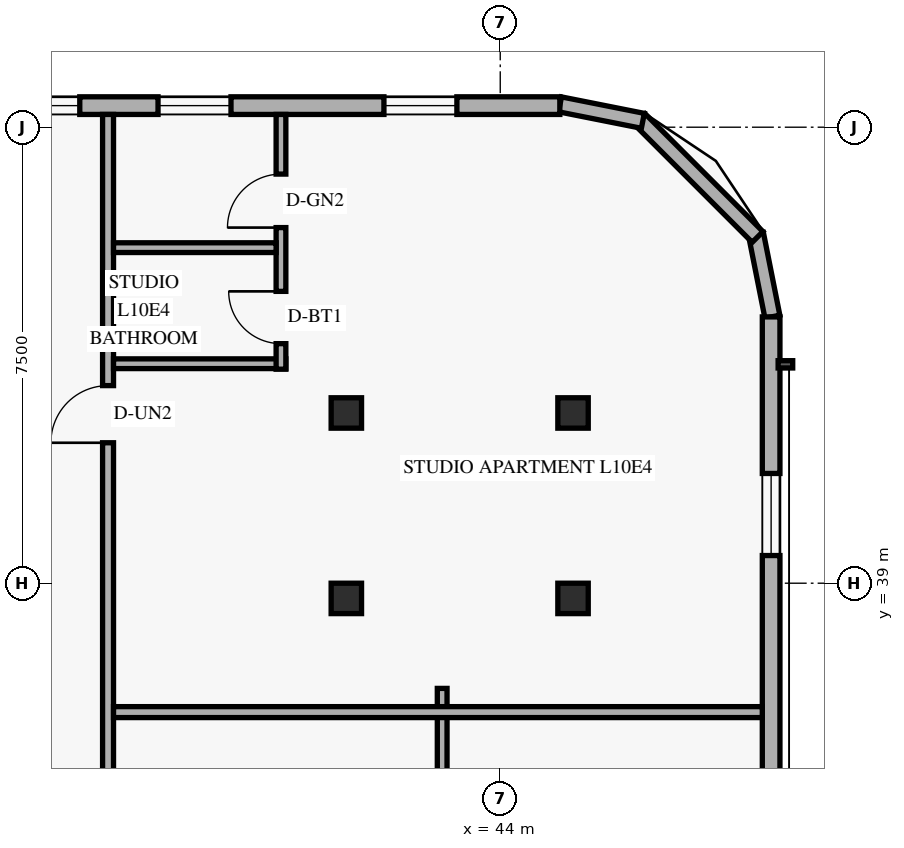
"""IFC4 building model, lengths in metres.
Left out: names, types, materials, properties, quantities, classifications, styles, units other than length and angle.
Written with IfcOpenShell. Run it as: python <this file> out.ifc"""

import sys

from ifc_helpers import new_model, si_unit, direction, frame, frame_2d, origin, origin_2d, place, context, subcontext, project, spatial, rectangle, hollow_rectangle, extrude, element, fill, save


model = new_model("IFC4")
c1 = context("Model", 3, precision=1e-05, world=origin(), true_north=direction((0.0, 1.0)))
c2 = subcontext(c1, "Body", "Model", "MODEL_VIEW")
j1 = project(units=[si_unit("LENGTHUNIT", "METRE"), si_unit("PLANEANGLEUNIT", "RADIAN")], contexts=[c1])
p1 = place(None, origin())
s1 = spatial("IfcSite", under=j1, at=p1, CompositionType="ELEMENT")
p2 = place(p1, origin())
s2 = spatial("IfcBuilding", under=s1, at=p2, CompositionType="ELEMENT")
p3 = place(p2, frame((0.0, 0.0, 42.0)))
s3 = spatial("IfcBuildingStorey", under=s2, at=p3, CompositionType="ELEMENT", Elevation=42.0)
for number, where, z_axis, x_axis in (
    (1, (41.406, 38.75, 0.0), (0.035, 0.0, 0.999), (0.0, 1.0, 0.0)),
    (2, (41.406, 41.8, 0.0), (0.035, 0.0, 0.999), (0.0, 1.0, 0.0)),
):
    element("IfcColumn", number, at=place(p3, frame(where, z_axis=z_axis, x_axis=x_axis)), inside=s3, PredefinedType="COLUMN", context=c2, shape_type="SweptSolid", body=[
        extrude(hollow_rectangle(XDim=0.5, YDim=0.5, WallThickness=0.022, at=origin_2d()), origin(), (0.0, 0.0, 1.0), 3.602),
    ])
for number, where, z_axis, x_axis in (
    (3, (45.093, 38.75, 0.0), (0.058, 0.0, 0.998), (0.0, 1.0, 0.0)),
    (4, (45.093, 41.8, 0.0), (0.058, 0.0, 0.998), (0.0, 1.0, 0.0)),
):
    element("IfcColumn", number, at=place(p3, frame(where, z_axis=z_axis, x_axis=x_axis)), inside=s3, PredefinedType="COLUMN", context=c2, shape_type="SweptSolid", body=[
        extrude(hollow_rectangle(XDim=0.5, YDim=0.5, WallThickness=0.022, at=origin_2d()), origin(), (0.0, 0.0, 1.0), 3.606),
    ])
p4 = place(p3, frame((48.476, 43.384, 0.0), z_axis=(0.0, 0.0, 1.0), x_axis=(-0.19496651342, 0.980809899341, 0.0)))
e5 = element("IfcWall", 5, at=p4, inside=s3, PredefinedType="SOLIDWALL", context=c2, shape_type="SweptSolid", body=[
    extrude(rectangle(XDim=1.389, YDim=0.25, at=frame_2d((0.694, 0.0))), origin(), (0.0, 0.0, 1.0), 3.36),
])
p5 = place(p3, frame((48.232, 44.695, 0.0), z_axis=(0.0, 0.0, 1.0), x_axis=(-0.707106781187, 0.707106781187, 0.0)))
e6 = element("IfcWall", 6, at=p5, inside=s3, PredefinedType="SOLIDWALL", context=c2, shape_type="SweptSolid", body=[
    extrude(rectangle(XDim=2.739, YDim=0.25, at=frame_2d((1.37, 0.0))), origin(), (0.0, 0.0, 1.0), 3.36),
])
p6 = place(p3, frame((46.345, 46.605, 0.0), z_axis=(0.0, 0.0, 1.0), x_axis=(-0.980809899341, 0.19496651342, 0.0)))
e7 = element("IfcWall", 7, at=p6, inside=s3, PredefinedType="SOLIDWALL", context=c2, shape_type="SweptSolid", body=[
    extrude(rectangle(XDim=1.389, YDim=0.25, at=frame_2d((0.694, 0.0))), origin(), (0.0, 0.0, 1.0), 3.36),
])
p7 = place(p3, frame((48.455, 4.62, 0.0), z_axis=(0.0, 0.0, 1.0), x_axis=(0.0, 1.0, 0.0)))
e8 = element("IfcWall", 8, at=p7, inside=s3, PredefinedType="SOLIDWALL", context=c2, shape_type="SweptSolid", body=[
    extrude(rectangle(XDim=38.76, YDim=0.29, at=frame_2d((19.38, 0.0))), origin(), (0.0, 0.0, 1.0), 3.36),
])
p8 = place(p7, frame((3.035, 0.0, 0.85)))
e9 = element("IfcOpeningElement", 9, at=p8, cuts=e8, PredefinedType="OPENING", context=c2, shape_type="SweptSolid", body=[
    extrude(rectangle(XDim=1.35, YDim=1.55, at=frame_2d((0.675, 0.775))), frame((0.0, 0.155, 0.0), z_axis=(0.0, -1.0, 0.0), x_axis=(1.0, 0.0, 0.0)), (0.0, 0.0, 1.0), 0.31),
])
p9 = place(p7, frame((11.365, 0.0, 0.85)))
e10 = element("IfcOpeningElement", 10, at=p9, cuts=e8, PredefinedType="OPENING", context=c2, shape_type="SweptSolid", body=[
    extrude(rectangle(XDim=1.35, YDim=1.55, at=frame_2d((0.675, 0.775))), frame((0.0, 0.155, 0.0), z_axis=(0.0, -1.0, 0.0), x_axis=(1.0, 0.0, 0.0)), (0.0, 0.0, 1.0), 0.31),
])
p10 = place(p7, frame((17.805, 0.0, 0.85)))
e11 = element("IfcOpeningElement", 11, at=p10, cuts=e8, PredefinedType="OPENING", context=c2, shape_type="SweptSolid", body=[
    extrude(rectangle(XDim=1.35, YDim=1.55, at=frame_2d((0.675, 0.775))), frame((0.0, 0.155, 0.0), z_axis=(0.0, -1.0, 0.0), x_axis=(1.0, 0.0, 0.0)), (0.0, 0.0, 1.0), 0.31),
])
p11 = place(p7, frame((23.61, 0.0, 0.85)))
e12 = element("IfcOpeningElement", 12, at=p11, cuts=e8, PredefinedType="OPENING", context=c2, shape_type="SweptSolid", body=[
    extrude(rectangle(XDim=1.35, YDim=1.55, at=frame_2d((0.675, 0.775))), frame((0.0, 0.155, 0.0), z_axis=(0.0, -1.0, 0.0), x_axis=(1.0, 0.0, 0.0)), (0.0, 0.0, 1.0), 0.31),
])
p12 = place(p7, frame((29.59, 0.0, 0.85)))
e13 = element("IfcOpeningElement", 13, at=p12, cuts=e8, PredefinedType="OPENING", context=c2, shape_type="SweptSolid", body=[
    extrude(rectangle(XDim=1.35, YDim=1.55, at=frame_2d((0.675, 0.775))), frame((0.0, 0.155, 0.0), z_axis=(0.0, -1.0, 0.0), x_axis=(1.0, 0.0, 0.0)), (0.0, 0.0, 1.0), 0.31),
])
p13 = place(p7, frame((34.835, 0.0, 0.85)))
e14 = element("IfcOpeningElement", 14, at=p13, cuts=e8, PredefinedType="OPENING", context=c2, shape_type="SweptSolid", body=[
    extrude(rectangle(XDim=1.35, YDim=1.55, at=frame_2d((0.675, 0.775))), frame((0.0, 0.155, 0.0), z_axis=(0.0, -1.0, 0.0), x_axis=(1.0, 0.0, 0.0)), (0.0, 0.0, 1.0), 0.31),
])
p14 = place(p3, frame((44.98, 46.855, 0.0), z_axis=(0.0, 0.0, 1.0), x_axis=(-1.0, 0.0, 0.0)))
e15 = element("IfcWall", 15, at=p14, inside=s3, PredefinedType="SOLIDWALL", context=c2, shape_type="SweptSolid", body=[
    extrude(rectangle(XDim=39.56, YDim=0.29, at=frame_2d((19.78, 0.0))), origin(), (0.0, 0.0, 1.0), 3.36),
])
p15 = place(p14, frame((35.52, 0.0, 0.85)))
e16 = element("IfcOpeningElement", 16, at=p15, cuts=e15, PredefinedType="OPENING", context=c2, shape_type="SweptSolid", body=[
    extrude(rectangle(XDim=1.2, YDim=1.5, at=frame_2d((0.6, 0.75))), frame((0.0, 0.155, 0.0), z_axis=(0.0, -1.0, 0.0), x_axis=(1.0, 0.0, 0.0)), (0.0, 0.0, 1.0), 0.31),
])
p16 = place(p14, frame((31.18, 0.0, 0.85)))
e17 = element("IfcOpeningElement", 17, at=p16, cuts=e15, PredefinedType="OPENING", context=c2, shape_type="SweptSolid", body=[
    extrude(rectangle(XDim=1.2, YDim=1.5, at=frame_2d((0.6, 0.75))), frame((0.0, 0.155, 0.0), z_axis=(0.0, -1.0, 0.0), x_axis=(1.0, 0.0, 0.0)), (0.0, 0.0, 1.0), 0.31),
])
p17 = place(p14, frame((25.909, 0.0, 0.85)))
e18 = element("IfcOpeningElement", 18, at=p17, cuts=e15, PredefinedType="OPENING", context=c2, shape_type="SweptSolid", body=[
    extrude(rectangle(XDim=1.2, YDim=1.5, at=frame_2d((0.6, 0.75))), frame((0.0, 0.155, 0.0), z_axis=(0.0, -1.0, 0.0), x_axis=(1.0, 0.0, 0.0)), (0.0, 0.0, 1.0), 0.31),
])
p18 = place(p14, frame((18.874, 0.0, 0.85)))
e19 = element("IfcOpeningElement", 19, at=p18, cuts=e15, PredefinedType="OPENING", context=c2, shape_type="SweptSolid", body=[
    extrude(rectangle(XDim=1.2, YDim=1.5, at=frame_2d((0.6, 0.75))), frame((0.0, 0.155, 0.0), z_axis=(0.0, -1.0, 0.0), x_axis=(1.0, 0.0, 0.0)), (0.0, 0.0, 1.0), 0.31),
])
p19 = place(p14, frame((12.584, 0.0, 0.85)))
e20 = element("IfcOpeningElement", 20, at=p19, cuts=e15, PredefinedType="OPENING", context=c2, shape_type="SweptSolid", body=[
    extrude(rectangle(XDim=1.2, YDim=1.5, at=frame_2d((0.6, 0.75))), frame((0.0, 0.155, 0.0), z_axis=(0.0, -1.0, 0.0), x_axis=(1.0, 0.0, 0.0)), (0.0, 0.0, 1.0), 0.31),
])
p20 = place(p14, frame((7.895, 0.0, 0.85)))
e21 = element("IfcOpeningElement", 21, at=p20, cuts=e15, PredefinedType="OPENING", context=c2, shape_type="SweptSolid", body=[
    extrude(rectangle(XDim=1.2, YDim=1.5, at=frame_2d((0.6, 0.75))), frame((0.0, 0.155, 0.0), z_axis=(0.0, -1.0, 0.0), x_axis=(1.0, 0.0, 0.0)), (0.0, 0.0, 1.0), 0.31),
])
p21 = place(p14, frame((5.408, 0.0, 0.85)))
e22 = element("IfcOpeningElement", 22, at=p21, cuts=e15, PredefinedType="OPENING", context=c2, shape_type="SweptSolid", body=[
    extrude(rectangle(XDim=1.2, YDim=1.5, at=frame_2d((0.6, 0.75))), frame((0.0, 0.155, 0.0), z_axis=(0.0, -1.0, 0.0), x_axis=(1.0, 0.0, 0.0)), (0.0, 0.0, 1.0), 0.31),
])
p22 = place(p14, frame((1.693, 0.0, 0.85)))
e23 = element("IfcOpeningElement", 23, at=p22, cuts=e15, PredefinedType="OPENING", context=c2, shape_type="SweptSolid", body=[
    extrude(rectangle(XDim=1.2, YDim=1.5, at=frame_2d((0.6, 0.75))), frame((0.0, 0.155, 0.0), z_axis=(0.0, -1.0, 0.0), x_axis=(1.0, 0.0, 0.0)), (0.0, 0.0, 1.0), 0.31),
])
p23 = place(p3, frame((37.55, 1.29, 0.0), z_axis=(0.0, 0.0, 1.0), x_axis=(0.0, 1.0, 0.0)))
e24 = element("IfcWall", 24, at=p23, inside=s3, PredefinedType="STANDARD", context=c2, shape_type="SweptSolid", body=[
    extrude(rectangle(XDim=45.42, YDim=0.18, at=frame_2d((22.71, 0.0))), origin(), (0.0, 0.0, 1.0), 2.649),
])
p24 = place(p23, frame((4.46, 0.0, 0.0)))
e25 = element("IfcOpeningElement", 25, at=p24, cuts=e24, PredefinedType="OPENING", context=c2, shape_type="SweptSolid", body=[
    extrude(rectangle(XDim=0.94, YDim=2.15, at=frame_2d((0.47, 1.075))), frame((0.0, 0.1, 0.0), z_axis=(0.0, -1.0, 0.0), x_axis=(1.0, 0.0, 0.0)), (0.0, 0.0, 1.0), 0.2),
])
p25 = place(p23, frame((15.907, 0.0, 0.0)))
e26 = element("IfcOpeningElement", 26, at=p25, cuts=e24, PredefinedType="OPENING", context=c2, shape_type="SweptSolid", body=[
    extrude(rectangle(XDim=0.94, YDim=2.15, at=frame_2d((0.47, 1.075))), frame((0.0, 0.1, 0.0), z_axis=(0.0, -1.0, 0.0), x_axis=(1.0, 0.0, 0.0)), (0.0, 0.0, 1.0), 0.2),
])
p26 = place(p23, frame((28.23, 0.0, 0.0)))
e27 = element("IfcOpeningElement", 27, at=p26, cuts=e24, PredefinedType="OPENING", context=c2, shape_type="SweptSolid", body=[
    extrude(rectangle(XDim=0.94, YDim=2.15, at=frame_2d((0.47, 1.075))), frame((0.0, 0.1, 0.0), z_axis=(0.0, -1.0, 0.0), x_axis=(1.0, 0.0, 0.0)), (0.0, 0.0, 1.0), 0.2),
])
p27 = place(p23, frame((40.02, 0.0, 0.0)))
e28 = element("IfcOpeningElement", 28, at=p27, cuts=e24, PredefinedType="OPENING", context=c2, shape_type="SweptSolid", body=[
    extrude(rectangle(XDim=0.94, YDim=2.15, at=frame_2d((0.47, 1.075))), frame((0.0, 0.1, 0.0), z_axis=(0.0, -1.0, 0.0), x_axis=(1.0, 0.0, 0.0)), (0.0, 0.0, 1.0), 0.2),
])
p28 = place(p3, frame((43.045, 32.81, 0.0), z_axis=(0.0, 0.0, 1.0), x_axis=(0.0, 1.0, 0.0)))
e29 = element("IfcWall", 29, at=p28, inside=s3, PredefinedType="PARTITIONING", context=c2, shape_type="SweptSolid", body=[
    extrude(rectangle(XDim=4.46, YDim=0.16, at=frame_2d((2.23, 0.0))), origin(), (0.0, 0.0, 1.0), 2.932),
])
p29 = place(p3, frame((37.64, 36.88, 0.0), z_axis=(0.0, 0.0, 1.0), x_axis=(1.0, 0.0, 0.0)))
e30 = element("IfcWall", 30, at=p29, inside=s3, PredefinedType="PARTITIONING", context=c2, shape_type="SweptSolid", body=[
    extrude(rectangle(XDim=10.67, YDim=0.18, at=frame_2d((5.335, 0.0))), origin(), (0.0, 0.0, 1.0), 2.649),
])
p30 = place(p3, frame((37.64, 42.61, 0.0), z_axis=(0.0, 0.0, 1.0), x_axis=(1.0, 0.0, 0.0)))
e31 = element("IfcWall", 31, at=p30, inside=s3, PredefinedType="PLUMBINGWALL", context=c2, shape_type="SweptSolid", body=[
    extrude(rectangle(XDim=2.834, YDim=0.16, at=frame_2d((1.417, 0.0))), origin(), (0.0, 0.0, 1.0), 3.36),
])
p31 = place(p3, frame((40.394, 42.52, 0.0), z_axis=(0.0, 0.0, 1.0), x_axis=(0.0, 1.0, 0.0)))
e32 = element("IfcWall", 32, at=p31, inside=s3, PredefinedType="PLUMBINGWALL", context=c2, shape_type="SweptSolid", body=[
    extrude(rectangle(XDim=4.19, YDim=0.16, at=frame_2d((2.095, 0.0))), origin(), (0.0, 0.0, 1.0), 3.36),
])
p32 = place(p31, frame((0.42, 0.0, 0.0)))
e33 = element("IfcOpeningElement", 33, at=p32, cuts=e32, PredefinedType="OPENING", context=c2, shape_type="SweptSolid", body=[
    extrude(rectangle(XDim=0.86, YDim=2.12, at=frame_2d((0.43, 1.06))), frame((0.0, 0.09, 0.0), z_axis=(0.0, -1.0, 0.0), x_axis=(1.0, 0.0, 0.0)), (0.0, 0.0, 1.0), 0.18),
])
p33 = place(p31, frame((2.329, 0.0, 0.0)))
e34 = element("IfcOpeningElement", 34, at=p33, cuts=e32, PredefinedType="OPENING", context=c2, shape_type="SweptSolid", body=[
    extrude(rectangle(XDim=0.88, YDim=2.12, at=frame_2d((0.44, 1.06))), frame((0.0, 0.09, 0.0), z_axis=(0.0, -1.0, 0.0), x_axis=(1.0, 0.0, 0.0)), (0.0, 0.0, 1.0), 0.18),
])
p34 = place(p3, frame((37.64, 44.519, 0.0), z_axis=(0.0, 0.0, 1.0), x_axis=(1.0, 0.0, 0.0)))
e35 = element("IfcWall", 35, at=p34, inside=s3, PredefinedType="PLUMBINGWALL", context=c2, shape_type="SweptSolid", body=[
    extrude(rectangle(XDim=2.674, YDim=0.16, at=frame_2d((1.337, 0.0))), origin(), (0.0, 0.0, 1.0), 3.36),
])
p35 = place(p13, origin())
e36 = element("IfcWindow", 36, at=p35, inside=s3, PartitioningType="SINGLE_PANEL", PredefinedType="WINDOW", context=c2, shape_type="SweptSolid", body=[
    extrude(rectangle(XDim=1.35, YDim=1.55, at=frame_2d((0.675, 0.775))), frame((0.0, 0.03, 0.0), z_axis=(0.0, -1.0, 0.0), x_axis=(1.0, 0.0, 0.0)), (0.0, 0.0, 1.0), 0.06),
])
fill(e14, e36)
p36 = place(p20, origin())
e37 = element("IfcWindow", 37, at=p36, inside=s3, PartitioningType="SINGLE_PANEL", PredefinedType="WINDOW", context=c2, shape_type="SweptSolid", body=[
    extrude(rectangle(XDim=1.2, YDim=1.5, at=frame_2d((0.6, 0.75))), frame((0.0, 0.03, 0.0), z_axis=(0.0, -1.0, 0.0), x_axis=(1.0, 0.0, 0.0)), (0.0, 0.0, 1.0), 0.06),
])
fill(e21, e37)
p37 = place(p21, origin())
e38 = element("IfcWindow", 38, at=p37, inside=s3, PartitioningType="SINGLE_PANEL", PredefinedType="WINDOW", context=c2, shape_type="SweptSolid", body=[
    extrude(rectangle(XDim=1.2, YDim=1.5, at=frame_2d((0.6, 0.75))), frame((0.0, 0.03, 0.0), z_axis=(0.0, -1.0, 0.0), x_axis=(1.0, 0.0, 0.0)), (0.0, 0.0, 1.0), 0.06),
])
fill(e22, e38)
p38 = place(p22, origin())
e39 = element("IfcWindow", 39, at=p38, inside=s3, PartitioningType="SINGLE_PANEL", PredefinedType="WINDOW", context=c2, shape_type="SweptSolid", body=[
    extrude(rectangle(XDim=1.2, YDim=1.5, at=frame_2d((0.6, 0.75))), frame((0.0, 0.03, 0.0), z_axis=(0.0, -1.0, 0.0), x_axis=(1.0, 0.0, 0.0)), (0.0, 0.0, 1.0), 0.06),
])
fill(e23, e39)
p39 = place(p27, origin())
e40 = element("IfcDoor", 40, at=p39, inside=s3, OperationType="SINGLE_SWING_LEFT", PredefinedType="DOOR", context=c2, shape_type="SweptSolid", body=[
    extrude(rectangle(XDim=0.94, YDim=2.15, at=frame_2d((0.47, 1.075))), frame((0.0, 0.025, 0.0), z_axis=(0.0, -1.0, 0.0), x_axis=(1.0, 0.0, 0.0)), (0.0, 0.0, 1.0), 0.05),
])
fill(e28, e40)
p40 = place(p32, origin())
e41 = element("IfcDoor", 41, at=p40, inside=s3, OperationType="SINGLE_SWING_RIGHT", PredefinedType="DOOR", context=c2, shape_type="SweptSolid", body=[
    extrude(rectangle(XDim=0.86, YDim=2.12, at=frame_2d((0.43, 1.06))), frame((0.0, 0.025, 0.0), z_axis=(0.0, -1.0, 0.0), x_axis=(1.0, 0.0, 0.0)), (0.0, 0.0, 1.0), 0.05),
])
fill(e33, e41)
p41 = place(p33, origin())
e42 = element("IfcDoor", 42, at=p41, inside=s3, OperationType="SINGLE_SWING_LEFT", PredefinedType="DOOR", context=c2, shape_type="SweptSolid", body=[
    extrude(rectangle(XDim=0.88, YDim=2.12, at=frame_2d((0.44, 1.06))), frame((0.0, 0.025, 0.0), z_axis=(0.0, -1.0, 0.0), x_axis=(1.0, 0.0, 0.0)), (0.0, 0.0, 1.0), 0.05),
])
fill(e34, e42)
save(model, sys.argv[1])
